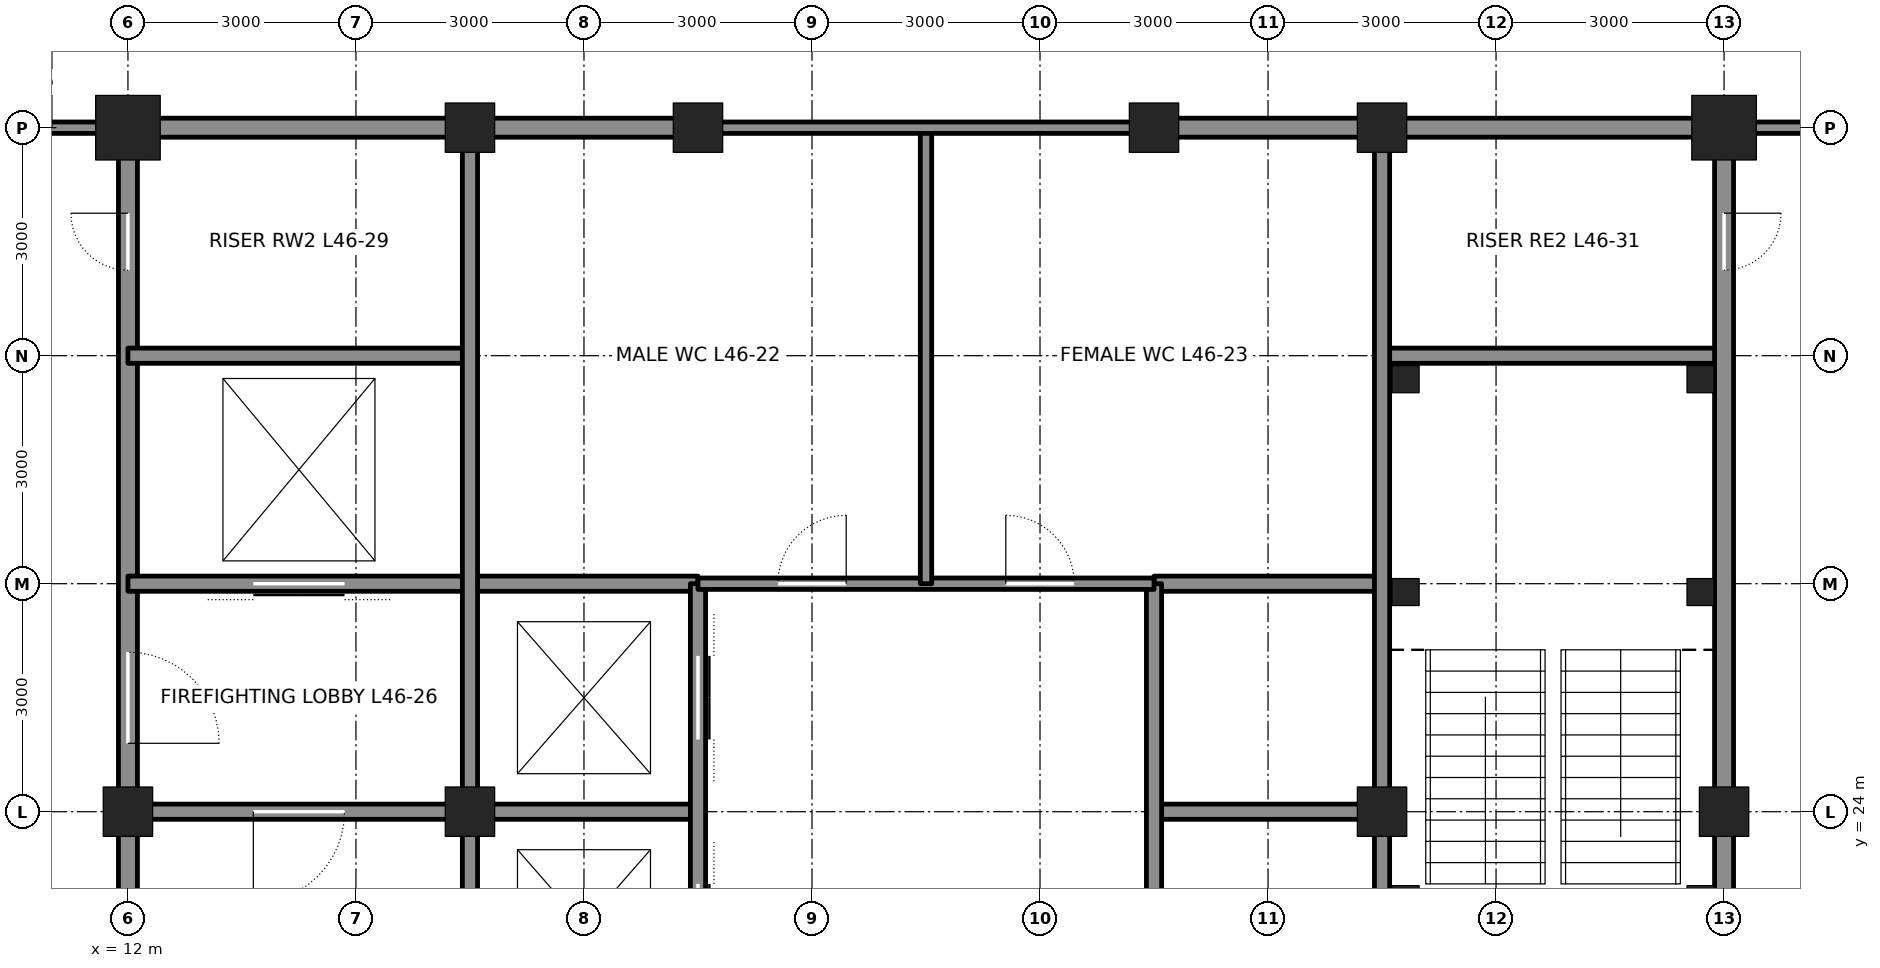
"""IFC4 building model, lengths in metres.
Left out: names, types, materials, properties, quantities, classifications, styles, units other than length and angle.
Written with IfcOpenShell. Run it as: python <this file> out.ifc"""

import sys

from ifc_helpers import new_model, si_unit, direction, frame, frame_2d, origin, origin_2d, place, context, subcontext, project, spatial, rectangle, hollow_rectangle, extrude, element, fill, save


model = new_model("IFC4")
c1 = context("Model", 3, precision=1e-05, world=origin(), true_north=direction((0.0, 1.0)))
c2 = subcontext(c1, "Body", "Model", "MODEL_VIEW")
j1 = project(units=[si_unit("LENGTHUNIT", "METRE"), si_unit("PLANEANGLEUNIT", "RADIAN")], contexts=[c1])
p1 = place(None, origin())
s1 = spatial("IfcSite", under=j1, at=p1, CompositionType="ELEMENT")
p2 = place(p1, origin())
s2 = spatial("IfcBuilding", under=s1, at=p2, CompositionType="ELEMENT")
p3 = place(p2, frame((0.0, 0.0, 209.7)))
s3 = spatial("IfcBuildingStorey", under=s2, at=p3, CompositionType="ELEMENT", Elevation=209.7)
p4 = place(p3, frame((12.0, 33.0, 0.0), z_axis=(0.0, 0.0, 1.0), x_axis=(1.0, 0.0, 0.0)))
e1 = element("IfcColumn", 1, at=p4, inside=s3, PredefinedType="COLUMN", context=c2, shape_type="SweptSolid", body=[
    extrude(hollow_rectangle(XDim=0.85, YDim=0.85, WallThickness=0.085, at=origin_2d()), origin(), (0.0, 0.0, 1.0), 4.2),
])
for number, where, z_axis, x_axis in (
    (2, (16.5, 33.0, 0.0), (0.0, 0.0, 1.0), (1.0, 0.0, 0.0)),
    (3, (19.5, 33.0, 0.0), (0.0, 0.0, 1.0), (1.0, 0.0, 0.0)),
    (4, (25.5, 33.0, 0.0), (0.0, 0.0, 1.0), (1.0, 0.0, 0.0)),
    (5, (28.5, 33.0, 0.0), (0.0, 0.0, 1.0), (1.0, 0.0, 0.0)),
):
    element("IfcColumn", number, at=place(p3, frame(where, z_axis=z_axis, x_axis=x_axis)), inside=s3, PredefinedType="COLUMN", context=c2, shape_type="SweptSolid", body=[
        extrude(hollow_rectangle(XDim=0.65, YDim=0.65, WallThickness=0.065, at=origin_2d()), origin(), (0.0, 0.0, 1.0), 4.2),
    ])
p5 = place(p3, frame((33.0, 33.0, 0.0), z_axis=(0.0, 0.0, 1.0), x_axis=(1.0, 0.0, 0.0)))
e6 = element("IfcColumn", 6, at=p5, inside=s3, PredefinedType="COLUMN", context=c2, shape_type="SweptSolid", body=[
    extrude(hollow_rectangle(XDim=0.85, YDim=0.85, WallThickness=0.085, at=origin_2d()), origin(), (0.0, 0.0, 1.0), 4.2),
])
for number, where, z_axis, x_axis in (
    (7, (12.0, 24.0, 0.0), (0.0, 0.0, 1.0), (1.0, 0.0, 0.0)),
    (8, (33.0, 24.0, 0.0), (0.0, 0.0, 1.0), (1.0, 0.0, 0.0)),
    (9, (16.5, 24.0, 0.0), (0.0, 0.0, 1.0), (1.0, 0.0, 0.0)),
    (10, (28.5, 24.0, 0.0), (0.0, 0.0, 1.0), (1.0, 0.0, 0.0)),
):
    element("IfcColumn", number, at=place(p3, frame(where, z_axis=z_axis, x_axis=x_axis)), inside=s3, PredefinedType="COLUMN", context=c2, shape_type="SweptSolid", body=[
        extrude(hollow_rectangle(XDim=0.65, YDim=0.65, WallThickness=0.065, at=origin_2d()), origin(), (0.0, 0.0, 1.0), 4.2),
    ])
p6 = place(p3, frame((12.0, 21.25, 0.0), z_axis=(0.0, 0.0, 1.0), x_axis=(0.0, 1.0, 0.0)))
e11 = element("IfcWall", 11, at=p6, inside=s3, PredefinedType="SOLIDWALL", context=c2, shape_type="SweptSolid", body=[
    extrude(rectangle(XDim=2.5, YDim=0.25, at=frame_2d((1.25, 0.0))), origin(), (0.0, 0.0, 1.0), 3.113),
])
p7 = place(p3, frame((12.0, 24.25, 0.0), z_axis=(0.0, 0.0, 1.0), x_axis=(0.0, 1.0, 0.0)))
e12 = element("IfcWall", 12, at=p7, inside=s3, PredefinedType="SOLIDWALL", context=c2, shape_type="SweptSolid", body=[
    extrude(rectangle(XDim=8.5, YDim=0.25, at=frame_2d((4.25, 0.0))), origin(), (0.0, 0.0, 1.0), 3.113),
])
p8 = place(p7, frame((0.65, 0.0, 0.0)))
e13 = element("IfcOpeningElement", 13, at=p8, cuts=e12, PredefinedType="OPENING", context=c2, shape_type="SweptSolid", body=[
    extrude(rectangle(XDim=1.2, YDim=2.1, at=frame_2d((0.6, 1.05))), frame((0.0, 0.135, 0.0), z_axis=(0.0, -1.0, 0.0), x_axis=(1.0, 0.0, 0.0)), (0.0, 0.0, 1.0), 0.27),
])
p9 = place(p7, frame((6.875, 0.0, 0.0)))
e14 = element("IfcOpeningElement", 14, at=p9, cuts=e12, PredefinedType="OPENING", context=c2, shape_type="SweptSolid", body=[
    extrude(rectangle(XDim=0.75, YDim=2.1, at=frame_2d((0.375, 1.05))), frame((0.0, 0.135, 0.0), z_axis=(0.0, -1.0, 0.0), x_axis=(1.0, 0.0, 0.0)), (0.0, 0.0, 1.0), 0.27),
])
p10 = place(p3, frame((12.25, 24.0, 0.0), z_axis=(0.0, 0.0, 1.0), x_axis=(1.0, 0.0, 0.0)))
e15 = element("IfcWall", 15, at=p10, inside=s3, PredefinedType="SOLIDWALL", context=c2, shape_type="SweptSolid", body=[
    extrude(rectangle(XDim=4.0, YDim=0.2, at=frame_2d((2.0, 0.0))), origin(), (0.0, 0.0, 1.0), 3.09),
])
p11 = place(p10, frame((1.4, 0.0, 0.0)))
e16 = element("IfcOpeningElement", 16, at=p11, cuts=e15, PredefinedType="OPENING", context=c2, shape_type="SweptSolid", body=[
    extrude(rectangle(XDim=1.2, YDim=2.1, at=frame_2d((0.6, 1.05))), frame((0.0, 0.11, 0.0), z_axis=(0.0, -1.0, 0.0), x_axis=(1.0, 0.0, 0.0)), (0.0, 0.0, 1.0), 0.22),
])
for number, where, z_axis, x_axis in (
    (17, (16.75, 24.0, 0.0), (0.0, 0.0, 1.0), (1.0, 0.0, 0.0)),
    (18, (25.5, 24.0, 0.0), (0.0, 0.0, 1.0), (1.0, 0.0, 0.0)),
):
    element("IfcWall", number, at=place(p3, frame(where, z_axis=z_axis, x_axis=x_axis)), inside=s3, PredefinedType="SOLIDWALL", context=c2, shape_type="SweptSolid", body=[
        extrude(rectangle(XDim=2.75, YDim=0.2, at=frame_2d((1.375, 0.0))), origin(), (0.0, 0.0, 1.0), 3.09),
    ])
p12 = place(p3, frame((12.0, 27.0, 0.0), z_axis=(0.0, 0.0, 1.0), x_axis=(1.0, 0.0, 0.0)))
e19 = element("IfcWall", 19, at=p12, inside=s3, PredefinedType="SOLIDWALL", context=c2, shape_type="SweptSolid", body=[
    extrude(rectangle(XDim=7.5, YDim=0.2, at=frame_2d((3.75, 0.0))), origin(), (0.0, 0.0, 1.0), 4.04),
])
p13 = place(p12, frame((1.65, 0.0, 0.0)))
e20 = element("IfcOpeningElement", 20, at=p13, cuts=e19, PredefinedType="OPENING", context=c2, shape_type="SweptSolid", body=[
    extrude(rectangle(XDim=1.2, YDim=2.1, at=frame_2d((0.6, 1.05))), frame((0.0, 0.11, 0.0), z_axis=(0.0, -1.0, 0.0), x_axis=(1.0, 0.0, 0.0)), (0.0, 0.0, 1.0), 0.22),
])
p14 = place(p3, frame((25.5, 27.0, 0.0), z_axis=(0.0, 0.0, 1.0), x_axis=(1.0, 0.0, 0.0)))
e21 = element("IfcWall", 21, at=p14, inside=s3, PredefinedType="SOLIDWALL", context=c2, shape_type="SweptSolid", body=[
    extrude(rectangle(XDim=3.0, YDim=0.2, at=frame_2d((1.5, 0.0))), origin(), (0.0, 0.0, 1.0), 4.04),
])
for number, where, z_axis, x_axis in (
    (22, (12.0, 30.0, 0.0), (0.0, 0.0, 1.0), (1.0, 0.0, 0.0)),
    (23, (28.5, 30.0, 0.0), (0.0, 0.0, 1.0), (1.0, 0.0, 0.0)),
):
    element("IfcWall", number, at=place(p3, frame(where, z_axis=z_axis, x_axis=x_axis)), inside=s3, PredefinedType="SOLIDWALL", context=c2, shape_type="SweptSolid", body=[
        extrude(rectangle(XDim=4.5, YDim=0.2, at=frame_2d((2.25, 0.0))), origin(), (0.0, 0.0, 1.0), 4.04),
    ])
p15 = place(p3, frame((12.25, 33.0, 0.0), z_axis=(0.0, 0.0, 1.0), x_axis=(1.0, 0.0, 0.0)))
e24 = element("IfcWall", 24, at=p15, inside=s3, PredefinedType="SOLIDWALL", context=c2, shape_type="SweptSolid", body=[
    extrude(rectangle(XDim=4.0, YDim=0.25, at=frame_2d((2.0, 0.0))), origin(), (0.0, 0.0, 1.0), 3.182),
])
for number, where, z_axis, x_axis in (
    (25, (16.75, 33.0, 0.0), (0.0, 0.0, 1.0), (1.0, 0.0, 0.0)),
    (26, (25.75, 33.0, 0.0), (0.0, 0.0, 1.0), (1.0, 0.0, 0.0)),
):
    element("IfcWall", number, at=place(p3, frame(where, z_axis=z_axis, x_axis=x_axis)), inside=s3, PredefinedType="SOLIDWALL", context=c2, shape_type="SweptSolid", body=[
        extrude(rectangle(XDim=2.5, YDim=0.25, at=frame_2d((1.25, 0.0))), origin(), (0.0, 0.0, 1.0), 3.182),
    ])
p16 = place(p3, frame((28.75, 33.0, 0.0), z_axis=(0.0, 0.0, 1.0), x_axis=(1.0, 0.0, 0.0)))
e27 = element("IfcWall", 27, at=p16, inside=s3, PredefinedType="SOLIDWALL", context=c2, shape_type="SweptSolid", body=[
    extrude(rectangle(XDim=4.0, YDim=0.25, at=frame_2d((2.0, 0.0))), origin(), (0.0, 0.0, 1.0), 3.182),
])
p17 = place(p3, frame((16.5, 21.25, 0.0), z_axis=(0.0, 0.0, 1.0), x_axis=(0.0, 1.0, 0.0)))
e28 = element("IfcWall", 28, at=p17, inside=s3, PredefinedType="SOLIDWALL", context=c2, shape_type="SweptSolid", body=[
    extrude(rectangle(XDim=2.5, YDim=0.2, at=frame_2d((1.25, 0.0))), origin(), (0.0, 0.0, 1.0), 3.113),
])
p18 = place(p3, frame((16.5, 24.25, 0.0), z_axis=(0.0, 0.0, 1.0), x_axis=(0.0, 1.0, 0.0)))
e29 = element("IfcWall", 29, at=p18, inside=s3, PredefinedType="SOLIDWALL", context=c2, shape_type="SweptSolid", body=[
    extrude(rectangle(XDim=8.5, YDim=0.2, at=frame_2d((4.25, 0.0))), origin(), (0.0, 0.0, 1.0), 3.113),
])
p19 = place(p3, frame((19.5, 15.0, 0.0), z_axis=(0.0, 0.0, 1.0), x_axis=(0.0, 1.0, 0.0)))
e30 = element("IfcWall", 30, at=p19, inside=s3, PredefinedType="SOLIDWALL", context=c2, shape_type="SweptSolid", body=[
    extrude(rectangle(XDim=12.0, YDim=0.2, at=frame_2d((6.0, 0.0))), origin(), (0.0, 0.0, 1.0), 3.065),
])
p20 = place(p19, frame((0.95, 0.0, 0.0)))
e31 = element("IfcOpeningElement", 31, at=p20, cuts=e30, PredefinedType="OPENING", context=c2, shape_type="SweptSolid", body=[
    extrude(rectangle(XDim=1.1, YDim=2.1, at=frame_2d((0.55, 1.05))), frame((0.0, 0.11, 0.0), z_axis=(0.0, -1.0, 0.0), x_axis=(1.0, 0.0, 0.0)), (0.0, 0.0, 1.0), 0.22),
])
p21 = place(p19, frame((3.95, 0.0, 0.0)))
e32 = element("IfcOpeningElement", 32, at=p21, cuts=e30, PredefinedType="OPENING", context=c2, shape_type="SweptSolid", body=[
    extrude(rectangle(XDim=1.1, YDim=2.1, at=frame_2d((0.55, 1.05))), frame((0.0, 0.11, 0.0), z_axis=(0.0, -1.0, 0.0), x_axis=(1.0, 0.0, 0.0)), (0.0, 0.0, 1.0), 0.22),
])
p22 = place(p19, frame((6.95, 0.0, 0.0)))
e33 = element("IfcOpeningElement", 33, at=p22, cuts=e30, PredefinedType="OPENING", context=c2, shape_type="SweptSolid", body=[
    extrude(rectangle(XDim=1.1, YDim=2.1, at=frame_2d((0.55, 1.05))), frame((0.0, 0.11, 0.0), z_axis=(0.0, -1.0, 0.0), x_axis=(1.0, 0.0, 0.0)), (0.0, 0.0, 1.0), 0.22),
])
p23 = place(p19, frame((9.95, 0.0, 0.0)))
e34 = element("IfcOpeningElement", 34, at=p23, cuts=e30, PredefinedType="OPENING", context=c2, shape_type="SweptSolid", body=[
    extrude(rectangle(XDim=1.1, YDim=2.1, at=frame_2d((0.55, 1.05))), frame((0.0, 0.11, 0.0), z_axis=(0.0, -1.0, 0.0), x_axis=(1.0, 0.0, 0.0)), (0.0, 0.0, 1.0), 0.22),
])
p24 = place(p3, frame((25.5, 15.0, 0.0), z_axis=(0.0, 0.0, 1.0), x_axis=(0.0, 1.0, 0.0)))
e35 = element("IfcWall", 35, at=p24, inside=s3, PredefinedType="SOLIDWALL", context=c2, shape_type="SweptSolid", body=[
    extrude(rectangle(XDim=12.0, YDim=0.2, at=frame_2d((6.0, 0.0))), origin(), (0.0, 0.0, 1.0), 3.065),
])
p25 = place(p3, frame((28.5, 21.25, 0.0), z_axis=(0.0, 0.0, 1.0), x_axis=(0.0, 1.0, 0.0)))
e36 = element("IfcWall", 36, at=p25, inside=s3, PredefinedType="SOLIDWALL", context=c2, shape_type="SweptSolid", body=[
    extrude(rectangle(XDim=2.5, YDim=0.2, at=frame_2d((1.25, 0.0))), origin(), (0.0, 0.0, 1.0), 3.113),
])
p26 = place(p3, frame((28.5, 24.25, 0.0), z_axis=(0.0, 0.0, 1.0), x_axis=(0.0, 1.0, 0.0)))
e37 = element("IfcWall", 37, at=p26, inside=s3, PredefinedType="SOLIDWALL", context=c2, shape_type="SweptSolid", body=[
    extrude(rectangle(XDim=8.5, YDim=0.2, at=frame_2d((4.25, 0.0))), origin(), (0.0, 0.0, 1.0), 3.113),
])
p27 = place(p3, frame((33.0, 21.25, 0.0), z_axis=(0.0, 0.0, 1.0), x_axis=(0.0, 1.0, 0.0)))
e38 = element("IfcWall", 38, at=p27, inside=s3, PredefinedType="SOLIDWALL", context=c2, shape_type="SweptSolid", body=[
    extrude(rectangle(XDim=2.5, YDim=0.25, at=frame_2d((1.25, 0.0))), origin(), (0.0, 0.0, 1.0), 3.113),
])
p28 = place(p3, frame((33.0, 24.25, 0.0), z_axis=(0.0, 0.0, 1.0), x_axis=(0.0, 1.0, 0.0)))
e39 = element("IfcWall", 39, at=p28, inside=s3, PredefinedType="SOLIDWALL", context=c2, shape_type="SweptSolid", body=[
    extrude(rectangle(XDim=8.5, YDim=0.25, at=frame_2d((4.25, 0.0))), origin(), (0.0, 0.0, 1.0), 3.113),
])
p29 = place(p28, frame((6.875, 0.0, 0.0)))
e40 = element("IfcOpeningElement", 40, at=p29, cuts=e39, PredefinedType="OPENING", context=c2, shape_type="SweptSolid", body=[
    extrude(rectangle(XDim=0.75, YDim=2.1, at=frame_2d((0.375, 1.05))), frame((0.0, 0.135, 0.0), z_axis=(0.0, -1.0, 0.0), x_axis=(1.0, 0.0, 0.0)), (0.0, 0.0, 1.0), 0.27),
])
p30 = place(p3, frame((19.5, 27.0, 0.0), z_axis=(0.0, 0.0, 1.0), x_axis=(1.0, 0.0, 0.0)))
e41 = element("IfcWall", 41, at=p30, inside=s3, PredefinedType="PARTITIONING", context=c2, shape_type="SweptSolid", body=[
    extrude(rectangle(XDim=6.0, YDim=0.15, at=frame_2d((3.0, 0.0))), origin(), (0.0, 0.0, 1.0), 4.04),
])
p31 = place(p30, frame((1.05, 0.0, 0.0)))
e42 = element("IfcOpeningElement", 42, at=p31, cuts=e41, PredefinedType="OPENING", context=c2, shape_type="SweptSolid", body=[
    extrude(rectangle(XDim=0.9, YDim=2.1, at=frame_2d((0.45, 1.05))), frame((0.0, 0.085, 0.0), z_axis=(0.0, -1.0, 0.0), x_axis=(1.0, 0.0, 0.0)), (0.0, 0.0, 1.0), 0.17),
])
p32 = place(p30, frame((4.05, 0.0, 0.0)))
e43 = element("IfcOpeningElement", 43, at=p32, cuts=e41, PredefinedType="OPENING", context=c2, shape_type="SweptSolid", body=[
    extrude(rectangle(XDim=0.9, YDim=2.1, at=frame_2d((0.45, 1.05))), frame((0.0, 0.085, 0.0), z_axis=(0.0, -1.0, 0.0), x_axis=(1.0, 0.0, 0.0)), (0.0, 0.0, 1.0), 0.17),
])
p33 = place(p3, frame((22.5, 27.0, 0.0), z_axis=(0.0, 0.0, 1.0), x_axis=(0.0, 1.0, 0.0)))
e44 = element("IfcWall", 44, at=p33, inside=s3, PredefinedType="PARTITIONING", context=c2, shape_type="SweptSolid", body=[
    extrude(rectangle(XDim=6.0, YDim=0.15, at=frame_2d((3.0, 0.0))), origin(), (0.0, 0.0, 1.0), 4.04),
])
p34 = place(p3, frame((19.5, 33.0, 0.0), z_axis=(0.0, 0.0, 1.0), x_axis=(1.0, 0.0, 0.0)))
e45 = element("IfcWall", 45, at=p34, inside=s3, PredefinedType="PARTITIONING", context=c2, shape_type="SweptSolid", body=[
    extrude(rectangle(XDim=6.0, YDim=0.15, at=frame_2d((3.0, 0.0))), origin(), (0.0, 0.0, 1.0), 3.182),
])
p35 = place(p3, frame((9.0, 33.0, 0.0), z_axis=(0.0, 0.0, 1.0), x_axis=(1.0, 0.0, 0.0)))
e46 = element("IfcWall", 46, at=p35, inside=s3, PredefinedType="PARTITIONING", context=c2, shape_type="SweptSolid", body=[
    extrude(rectangle(XDim=3.0, YDim=0.15, at=frame_2d((1.5, 0.0))), origin(), (0.0, 0.0, 1.0), 3.271),
])
p36 = place(p35, frame((1.0, 0.0, 0.0)))
e47 = element("IfcOpeningElement", 47, at=p36, cuts=e46, PredefinedType="OPENING", context=c2, shape_type="SweptSolid", body=[
    extrude(rectangle(XDim=1.0, YDim=2.4, at=frame_2d((0.5, 1.2))), frame((0.0, 0.085, 0.0), z_axis=(0.0, -1.0, 0.0), x_axis=(1.0, 0.0, 0.0)), (0.0, 0.0, 1.0), 0.17),
])
p37 = place(p3, frame((33.0, 33.0, 0.0), z_axis=(0.0, 0.0, 1.0), x_axis=(1.0, 0.0, 0.0)))
e48 = element("IfcWall", 48, at=p37, inside=s3, PredefinedType="PARTITIONING", context=c2, shape_type="SweptSolid", body=[
    extrude(rectangle(XDim=1.8, YDim=0.15, at=frame_2d((0.9, 0.0))), origin(), (0.0, 0.0, 1.0), 3.271),
])
for number, where, z_axis, x_axis in (
    (49, (28.81, 29.69, 0.0), (0.0, 0.0, 1.0), (1.0, 0.0, 0.0)),
    (50, (32.69, 29.69, 0.0), (0.0, 0.0, 1.0), (1.0, 0.0, 0.0)),
    (51, (28.81, 26.89, 0.0), (0.0, 0.0, 1.0), (1.0, 0.0, 0.0)),
    (52, (32.69, 26.89, 0.0), (0.0, 0.0, 1.0), (1.0, 0.0, 0.0)),
    (53, (28.81, 22.85, 0.0), (0.0, 0.0, 1.0), (1.0, 0.0, 0.0)),
    (54, (32.69, 22.85, 0.0), (0.0, 0.0, 1.0), (1.0, 0.0, 0.0)),
):
    element("IfcColumn", number, at=place(p3, frame(where, z_axis=z_axis, x_axis=x_axis)), inside=s3, PredefinedType="COLUMN", context=c2, shape_type="SweptSolid", body=[
        extrude(hollow_rectangle(XDim=0.356, YDim=0.356, WallThickness=0.009, at=origin_2d()), origin(), (0.0, 0.0, 1.0), 4.2),
    ])
p38 = place(p11, frame((1.2, 0.0, 0.0), z_axis=(0.0, 0.0, 1.0), x_axis=(-1.0, 0.0, 0.0)))
e55 = element("IfcDoor", 55, at=p38, inside=s3, OperationType="SINGLE_SWING_RIGHT", PredefinedType="DOOR", context=c2, shape_type="SweptSolid", body=[
    extrude(rectangle(XDim=1.2, YDim=2.1, at=frame_2d((0.6, 1.05))), frame((0.0, 0.025, 0.0), z_axis=(0.0, -1.0, 0.0), x_axis=(1.0, 0.0, 0.0)), (0.0, 0.0, 1.0), 0.05),
])
fill(e16, e55)
p39 = place(p8, frame((1.2, 0.0, 0.0), z_axis=(0.0, 0.0, 1.0), x_axis=(-1.0, 0.0, 0.0)))
e56 = element("IfcDoor", 56, at=p39, inside=s3, OperationType="SINGLE_SWING_RIGHT", PredefinedType="DOOR", context=c2, shape_type="SweptSolid", body=[
    extrude(rectangle(XDim=1.2, YDim=2.1, at=frame_2d((0.6, 1.05))), frame((0.0, 0.025, 0.0), z_axis=(0.0, -1.0, 0.0), x_axis=(1.0, 0.0, 0.0)), (0.0, 0.0, 1.0), 0.05),
])
fill(e13, e56)
p40 = place(p13, origin())
e57 = element("IfcDoor", 57, at=p40, inside=s3, OperationType="DOUBLE_DOOR_SLIDING", PredefinedType="DOOR", context=c2, shape_type="SweptSolid", body=[
    extrude(rectangle(XDim=1.2, YDim=2.1, at=frame_2d((0.6, 1.05))), frame((0.0, 0.025, 0.0), z_axis=(0.0, -1.0, 0.0), x_axis=(1.0, 0.0, 0.0)), (0.0, 0.0, 1.0), 0.05),
])
fill(e20, e57)
p41 = place(p9, origin())
e58 = element("IfcDoor", 58, at=p41, inside=s3, OperationType="SINGLE_SWING_RIGHT", PredefinedType="DOOR", context=c2, shape_type="SweptSolid", body=[
    extrude(rectangle(XDim=0.75, YDim=2.1, at=frame_2d((0.375, 1.05))), frame((0.0, 0.025, 0.0), z_axis=(0.0, -1.0, 0.0), x_axis=(1.0, 0.0, 0.0)), (0.0, 0.0, 1.0), 0.05),
])
fill(e14, e58)
p42 = place(p29, frame((0.75, 0.0, 0.0), z_axis=(0.0, 0.0, 1.0), x_axis=(-1.0, 0.0, 0.0)))
e59 = element("IfcDoor", 59, at=p42, inside=s3, OperationType="SINGLE_SWING_LEFT", PredefinedType="DOOR", context=c2, shape_type="SweptSolid", body=[
    extrude(rectangle(XDim=0.75, YDim=2.1, at=frame_2d((0.375, 1.05))), frame((0.0, 0.025, 0.0), z_axis=(0.0, -1.0, 0.0), x_axis=(1.0, 0.0, 0.0)), (0.0, 0.0, 1.0), 0.05),
])
fill(e40, e59)
p43 = place(p31, origin())
e60 = element("IfcDoor", 60, at=p43, inside=s3, OperationType="SINGLE_SWING_RIGHT", PredefinedType="DOOR", context=c2, shape_type="SweptSolid", body=[
    extrude(rectangle(XDim=0.9, YDim=2.1, at=frame_2d((0.45, 1.05))), frame((0.0, 0.025, 0.0), z_axis=(0.0, -1.0, 0.0), x_axis=(1.0, 0.0, 0.0)), (0.0, 0.0, 1.0), 0.05),
])
fill(e42, e60)
p44 = place(p32, origin())
e61 = element("IfcDoor", 61, at=p44, inside=s3, OperationType="SINGLE_SWING_LEFT", PredefinedType="DOOR", context=c2, shape_type="SweptSolid", body=[
    extrude(rectangle(XDim=0.9, YDim=2.1, at=frame_2d((0.45, 1.05))), frame((0.0, 0.025, 0.0), z_axis=(0.0, -1.0, 0.0), x_axis=(1.0, 0.0, 0.0)), (0.0, 0.0, 1.0), 0.05),
])
fill(e43, e61)
p45 = place(p22, origin())
e62 = element("IfcDoor", 62, at=p45, inside=s3, OperationType="DOUBLE_DOOR_SLIDING", PredefinedType="DOOR", context=c2, shape_type="SweptSolid", body=[
    extrude(rectangle(XDim=1.1, YDim=2.1, at=frame_2d((0.55, 1.05))), frame((0.0, 0.025, 0.0), z_axis=(0.0, -1.0, 0.0), x_axis=(1.0, 0.0, 0.0)), (0.0, 0.0, 1.0), 0.05),
])
fill(e33, e62)
p46 = place(p23, origin())
e63 = element("IfcDoor", 63, at=p46, inside=s3, OperationType="DOUBLE_DOOR_SLIDING", PredefinedType="DOOR", context=c2, shape_type="SweptSolid", body=[
    extrude(rectangle(XDim=1.1, YDim=2.1, at=frame_2d((0.55, 1.05))), frame((0.0, 0.025, 0.0), z_axis=(0.0, -1.0, 0.0), x_axis=(1.0, 0.0, 0.0)), (0.0, 0.0, 1.0), 0.05),
])
fill(e34, e63)
save(model, sys.argv[1])
